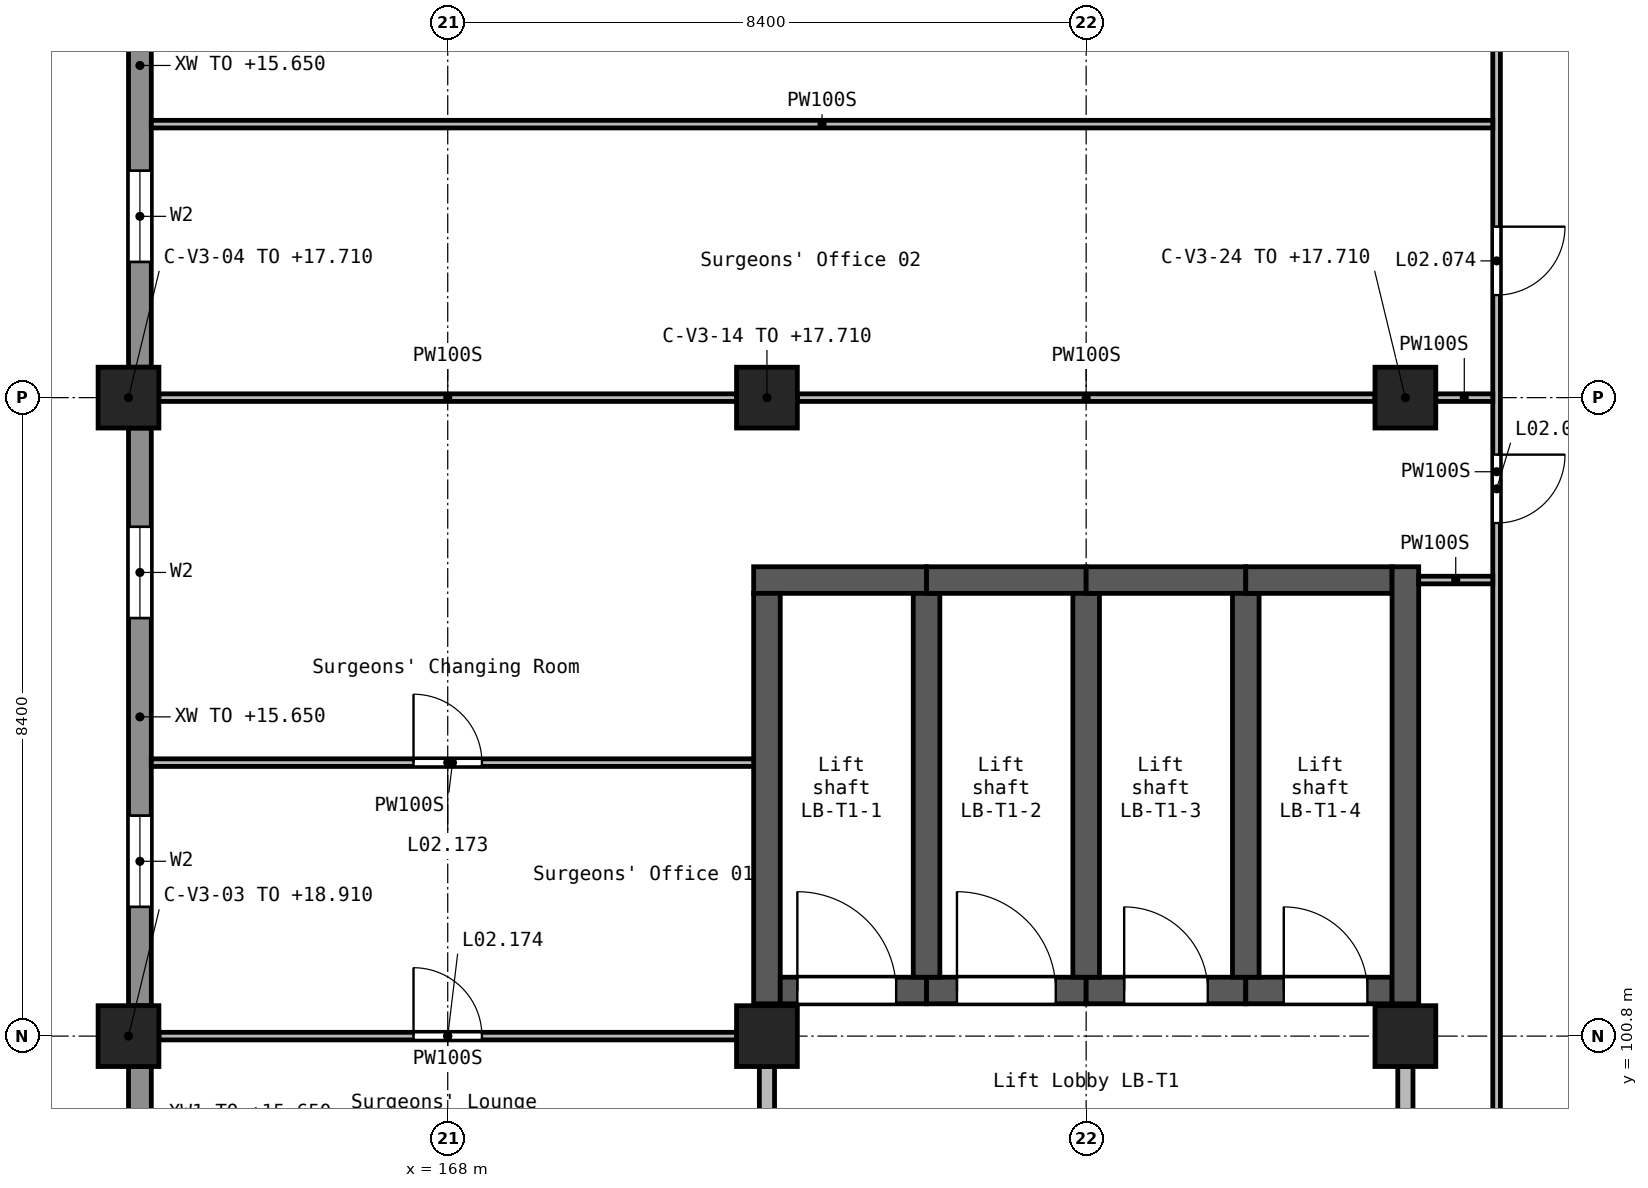
"""IFC4 building model, lengths in metres.
Left out: names, types, materials, properties, quantities, classifications, styles, units other than length and angle.
Written with IfcOpenShell. Run it as: python <this file> out.ifc"""

import sys

from ifc_helpers import new_model, si_unit, direction, frame, frame_2d, origin, origin_2d, place, context, subcontext, project, spatial, rectangle, extrude, element, fill, save


model = new_model("IFC4")
c1 = context("Model", 3, precision=1e-05, world=origin(), true_north=direction((0.0, 1.0)))
c2 = subcontext(c1, "Body", "Model", "MODEL_VIEW")
j1 = project(units=[si_unit("LENGTHUNIT", "METRE"), si_unit("PLANEANGLEUNIT", "RADIAN")], contexts=[c1])
p1 = place(None, origin())
s1 = spatial("IfcSite", under=j1, at=p1, CompositionType="ELEMENT")
p2 = place(p1, origin())
s2 = spatial("IfcBuilding", under=s1, at=p2, CompositionType="ELEMENT")
p3 = place(p2, frame((0.0, 0.0, 12.6)))
s3 = spatial("IfcBuildingStorey", under=s2, at=p3, CompositionType="ELEMENT", Elevation=12.6)
p4 = place(p3, frame((163.8, 100.8, 0.0), z_axis=(0.0, 0.0, 1.0), x_axis=(1.0, 0.0, 0.0)))
e1 = element("IfcColumn", 1, at=p4, inside=s3, PredefinedType="COLUMN", context=c2, shape_type="SweptSolid", body=[
    extrude(rectangle(XDim=0.8, YDim=0.8, at=origin_2d()), origin(), (0.0, 0.0, 1.0), 6.31),
])
p5 = place(p3, frame((163.8, 109.2, 0.0), z_axis=(0.0, 0.0, 1.0), x_axis=(1.0, 0.0, 0.0)))
e2 = element("IfcColumn", 2, at=p5, inside=s3, PredefinedType="COLUMN", context=c2, shape_type="SweptSolid", body=[
    extrude(rectangle(XDim=0.8, YDim=0.8, at=origin_2d()), origin(), (0.0, 0.0, 1.0), 5.11),
])
p6 = place(p3, frame((172.2, 100.8, 0.0), z_axis=(0.0, 0.0, 1.0), x_axis=(1.0, 0.0, 0.0)))
e3 = element("IfcColumn", 3, at=p6, inside=s3, PredefinedType="COLUMN", context=c2, shape_type="SweptSolid", body=[
    extrude(rectangle(XDim=0.8, YDim=0.8, at=origin_2d()), origin(), (0.0, 0.0, 1.0), 6.31),
])
p7 = place(p3, frame((172.2, 109.2, 0.0), z_axis=(0.0, 0.0, 1.0), x_axis=(1.0, 0.0, 0.0)))
e4 = element("IfcColumn", 4, at=p7, inside=s3, PredefinedType="COLUMN", context=c2, shape_type="SweptSolid", body=[
    extrude(rectangle(XDim=0.8, YDim=0.8, at=origin_2d()), origin(), (0.0, 0.0, 1.0), 5.11),
])
p8 = place(p3, frame((180.6, 100.8, 0.0), z_axis=(0.0, 0.0, 1.0), x_axis=(1.0, 0.0, 0.0)))
e5 = element("IfcColumn", 5, at=p8, inside=s3, PredefinedType="COLUMN", context=c2, shape_type="SweptSolid", body=[
    extrude(rectangle(XDim=0.8, YDim=0.8, at=origin_2d()), origin(), (0.0, 0.0, 1.0), 6.31),
])
p9 = place(p3, frame((180.6, 109.2, 0.0), z_axis=(0.0, 0.0, 1.0), x_axis=(1.0, 0.0, 0.0)))
e6 = element("IfcColumn", 6, at=p9, inside=s3, PredefinedType="COLUMN", context=c2, shape_type="SweptSolid", body=[
    extrude(rectangle(XDim=0.8, YDim=0.8, at=origin_2d()), origin(), (0.0, 0.0, 1.0), 5.11),
])
p10 = place(p3, frame((172.025, 106.8, 0.0), z_axis=(0.0, 0.0, 1.0), x_axis=(1.0, 0.0, 0.0)))
e7 = element("IfcWall", 7, at=p10, inside=s3, PredefinedType="SHEAR", context=c2, shape_type="SweptSolid", body=[
    extrude(rectangle(XDim=2.275, YDim=0.35, at=frame_2d((1.138, 0.0))), origin(), (0.0, 0.0, 1.0), 4.2),
])
p11 = place(p3, frame((172.2, 101.225, 0.0), z_axis=(0.0, 0.0, 1.0), x_axis=(0.0, 1.0, 0.0)))
e8 = element("IfcWall", 8, at=p11, inside=s3, PredefinedType="SHEAR", context=c2, shape_type="SweptSolid", body=[
    extrude(rectangle(XDim=5.4, YDim=0.35, at=frame_2d((2.7, 0.0))), origin(), (0.0, 0.0, 1.0), 4.2),
])
p12 = place(p3, frame((172.375, 101.4, 0.0), z_axis=(0.0, 0.0, 1.0), x_axis=(1.0, 0.0, 0.0)))
e9 = element("IfcWall", 9, at=p12, inside=s3, PredefinedType="SHEAR", context=c2, shape_type="SweptSolid", body=[
    extrude(rectangle(XDim=1.925, YDim=0.35, at=frame_2d((0.962, 0.0))), origin(), (0.0, 0.0, 1.0), 4.2),
])
p13 = place(p12, frame((0.225, 0.0, 0.0)))
e10 = element("IfcOpeningElement", 10, at=p13, cuts=e9, PredefinedType="OPENING", context=c2, shape_type="SweptSolid", body=[
    extrude(rectangle(XDim=1.3, YDim=2.1, at=frame_2d((0.65, 1.05))), frame((0.0, 0.185, 0.0), z_axis=(0.0, -1.0, 0.0), x_axis=(1.0, 0.0, 0.0)), (0.0, 0.0, 1.0), 0.37),
])
p14 = place(p3, frame((174.3, 101.4, 0.0), z_axis=(0.0, 0.0, 1.0), x_axis=(1.0, 0.0, 0.0)))
e11 = element("IfcWall", 11, at=p14, inside=s3, PredefinedType="SHEAR", context=c2, shape_type="SweptSolid", body=[
    extrude(rectangle(XDim=2.1, YDim=0.35, at=frame_2d((1.05, 0.0))), origin(), (0.0, 0.0, 1.0), 4.2),
])
p15 = place(p14, frame((0.4, 0.0, 0.0)))
e12 = element("IfcOpeningElement", 12, at=p15, cuts=e11, PredefinedType="OPENING", context=c2, shape_type="SweptSolid", body=[
    extrude(rectangle(XDim=1.3, YDim=2.1, at=frame_2d((0.65, 1.05))), frame((0.0, 0.185, 0.0), z_axis=(0.0, -1.0, 0.0), x_axis=(1.0, 0.0, 0.0)), (0.0, 0.0, 1.0), 0.37),
])
p16 = place(p3, frame((174.3, 101.575, 0.0), z_axis=(0.0, 0.0, 1.0), x_axis=(0.0, 1.0, 0.0)))
e13 = element("IfcWall", 13, at=p16, inside=s3, PredefinedType="SHEAR", context=c2, shape_type="SweptSolid", body=[
    extrude(rectangle(XDim=5.05, YDim=0.35, at=frame_2d((2.525, 0.0))), origin(), (0.0, 0.0, 1.0), 4.2),
])
p17 = place(p3, frame((174.3, 106.8, 0.0), z_axis=(0.0, 0.0, 1.0), x_axis=(1.0, 0.0, 0.0)))
e14 = element("IfcWall", 14, at=p17, inside=s3, PredefinedType="SHEAR", context=c2, shape_type="SweptSolid", body=[
    extrude(rectangle(XDim=2.1, YDim=0.35, at=frame_2d((1.05, 0.0))), origin(), (0.0, 0.0, 1.0), 4.2),
])
p18 = place(p3, frame((176.4, 101.4, 0.0), z_axis=(0.0, 0.0, 1.0), x_axis=(1.0, 0.0, 0.0)))
e15 = element("IfcWall", 15, at=p18, inside=s3, PredefinedType="SHEAR", context=c2, shape_type="SweptSolid", body=[
    extrude(rectangle(XDim=2.1, YDim=0.35, at=frame_2d((1.05, 0.0))), origin(), (0.0, 0.0, 1.0), 4.2),
])
p19 = place(p18, frame((0.5, 0.0, 0.0)))
e16 = element("IfcOpeningElement", 16, at=p19, cuts=e15, PredefinedType="OPENING", context=c2, shape_type="SweptSolid", body=[
    extrude(rectangle(XDim=1.1, YDim=2.1, at=frame_2d((0.55, 1.05))), frame((0.0, 0.185, 0.0), z_axis=(0.0, -1.0, 0.0), x_axis=(1.0, 0.0, 0.0)), (0.0, 0.0, 1.0), 0.37),
])
p20 = place(p3, frame((176.4, 101.575, 0.0), z_axis=(0.0, 0.0, 1.0), x_axis=(0.0, 1.0, 0.0)))
e17 = element("IfcWall", 17, at=p20, inside=s3, PredefinedType="SHEAR", context=c2, shape_type="SweptSolid", body=[
    extrude(rectangle(XDim=5.05, YDim=0.35, at=frame_2d((2.525, 0.0))), origin(), (0.0, 0.0, 1.0), 4.2),
])
p21 = place(p3, frame((176.4, 106.8, 0.0), z_axis=(0.0, 0.0, 1.0), x_axis=(1.0, 0.0, 0.0)))
e18 = element("IfcWall", 18, at=p21, inside=s3, PredefinedType="SHEAR", context=c2, shape_type="SweptSolid", body=[
    extrude(rectangle(XDim=2.1, YDim=0.35, at=frame_2d((1.05, 0.0))), origin(), (0.0, 0.0, 1.0), 4.2),
])
p22 = place(p3, frame((178.5, 101.4, 0.0), z_axis=(0.0, 0.0, 1.0), x_axis=(1.0, 0.0, 0.0)))
e19 = element("IfcWall", 19, at=p22, inside=s3, PredefinedType="SHEAR", context=c2, shape_type="SweptSolid", body=[
    extrude(rectangle(XDim=1.925, YDim=0.35, at=frame_2d((0.962, 0.0))), origin(), (0.0, 0.0, 1.0), 4.2),
])
p23 = place(p22, frame((0.5, 0.0, 0.0)))
e20 = element("IfcOpeningElement", 20, at=p23, cuts=e19, PredefinedType="OPENING", context=c2, shape_type="SweptSolid", body=[
    extrude(rectangle(XDim=1.1, YDim=2.1, at=frame_2d((0.55, 1.05))), frame((0.0, 0.185, 0.0), z_axis=(0.0, -1.0, 0.0), x_axis=(1.0, 0.0, 0.0)), (0.0, 0.0, 1.0), 0.37),
])
p24 = place(p3, frame((178.5, 101.575, 0.0), z_axis=(0.0, 0.0, 1.0), x_axis=(0.0, 1.0, 0.0)))
e21 = element("IfcWall", 21, at=p24, inside=s3, PredefinedType="SHEAR", context=c2, shape_type="SweptSolid", body=[
    extrude(rectangle(XDim=5.05, YDim=0.35, at=frame_2d((2.525, 0.0))), origin(), (0.0, 0.0, 1.0), 4.2),
])
p25 = place(p3, frame((178.5, 106.8, 0.0), z_axis=(0.0, 0.0, 1.0), x_axis=(1.0, 0.0, 0.0)))
e22 = element("IfcWall", 22, at=p25, inside=s3, PredefinedType="SHEAR", context=c2, shape_type="SweptSolid", body=[
    extrude(rectangle(XDim=1.925, YDim=0.35, at=frame_2d((0.962, 0.0))), origin(), (0.0, 0.0, 1.0), 4.2),
])
p26 = place(p3, frame((180.6, 101.225, 0.0), z_axis=(0.0, 0.0, 1.0), x_axis=(0.0, 1.0, 0.0)))
e23 = element("IfcWall", 23, at=p26, inside=s3, PredefinedType="SHEAR", context=c2, shape_type="SweptSolid", body=[
    extrude(rectangle(XDim=5.75, YDim=0.35, at=frame_2d((2.875, 0.0))), origin(), (0.0, 0.0, 1.0), 4.2),
])
p27 = place(p3, frame((163.95, 117.54, 0.0), z_axis=(0.0, 0.0, 1.0), x_axis=(0.0, -1.0, 0.0)))
e24 = element("IfcWall", 24, at=p27, inside=s3, PredefinedType="STANDARD", context=c2, shape_type="SweptSolid", body=[
    extrude(rectangle(XDim=7.94, YDim=0.3, at=frame_2d((3.97, 0.0))), origin(), (0.0, 0.0, 1.0), 3.05),
])
p28 = place(p27, frame((1.385, 0.0, 1.2)))
e25 = element("IfcOpeningElement", 25, at=p28, cuts=e24, PredefinedType="OPENING", context=c2, shape_type="SweptSolid", body=[
    extrude(rectangle(XDim=1.2, YDim=1.2, at=frame_2d((0.6, 0.6))), frame((0.0, 0.16, 0.0), z_axis=(0.0, -1.0, 0.0), x_axis=(1.0, 0.0, 0.0)), (0.0, 0.0, 1.0), 0.32),
])
p29 = place(p27, frame((5.355, 0.0, 1.2)))
e26 = element("IfcOpeningElement", 26, at=p29, cuts=e24, PredefinedType="OPENING", context=c2, shape_type="SweptSolid", body=[
    extrude(rectangle(XDim=1.2, YDim=1.2, at=frame_2d((0.6, 0.6))), frame((0.0, 0.16, 0.0), z_axis=(0.0, -1.0, 0.0), x_axis=(1.0, 0.0, 0.0)), (0.0, 0.0, 1.0), 0.32),
])
p30 = place(p3, frame((163.95, 108.8, 0.0), z_axis=(0.0, 0.0, 1.0), x_axis=(0.0, -1.0, 0.0)))
e27 = element("IfcWall", 27, at=p30, inside=s3, PredefinedType="STANDARD", context=c2, shape_type="SweptSolid", body=[
    extrude(rectangle(XDim=7.6, YDim=0.3, at=frame_2d((3.8, 0.0))), origin(), (0.0, 0.0, 1.0), 3.05),
])
p31 = place(p30, frame((1.3, 0.0, 1.2)))
e28 = element("IfcOpeningElement", 28, at=p31, cuts=e27, PredefinedType="OPENING", context=c2, shape_type="SweptSolid", body=[
    extrude(rectangle(XDim=1.2, YDim=1.2, at=frame_2d((0.6, 0.6))), frame((0.0, 0.16, 0.0), z_axis=(0.0, -1.0, 0.0), x_axis=(1.0, 0.0, 0.0)), (0.0, 0.0, 1.0), 0.32),
])
p32 = place(p30, frame((5.1, 0.0, 1.2)))
e29 = element("IfcOpeningElement", 29, at=p32, cuts=e27, PredefinedType="OPENING", context=c2, shape_type="SweptSolid", body=[
    extrude(rectangle(XDim=1.2, YDim=1.2, at=frame_2d((0.6, 0.6))), frame((0.0, 0.16, 0.0), z_axis=(0.0, -1.0, 0.0), x_axis=(1.0, 0.0, 0.0)), (0.0, 0.0, 1.0), 0.32),
])
p33 = place(p3, frame((163.95, 100.4, 0.0), z_axis=(0.0, 0.0, 1.0), x_axis=(0.0, -1.0, 0.0)))
e30 = element("IfcWall", 30, at=p33, inside=s3, PredefinedType="STANDARD", context=c2, shape_type="SweptSolid", body=[
    extrude(rectangle(XDim=1.225, YDim=0.3, at=frame_2d((0.612, 0.0))), origin(), (0.0, 0.0, 1.0), 3.05),
])
for number, where, z_axis, x_axis in (
    (31, (172.2, 99.1, 0.0), (0.0, 0.0, 1.0), (0.0, 1.0, 0.0)),
    (32, (180.6, 99.1, 0.0), (0.0, 0.0, 1.0), (0.0, 1.0, 0.0)),
):
    element("IfcWall", number, at=place(p3, frame(where, z_axis=z_axis, x_axis=x_axis)), inside=s3, PredefinedType="SOLIDWALL", context=c2, shape_type="SweptSolid", body=[
        extrude(rectangle(XDim=1.3, YDim=0.2, at=frame_2d((0.65, 0.0))), origin(), (0.0, 0.0, 1.0), 3.85),
    ])
p34 = place(p3, frame((181.8, 117.5, 0.0), z_axis=(0.0, 0.0, 1.0), x_axis=(0.0, -1.0, 0.0)))
e33 = element("IfcWall", 33, at=p34, inside=s3, PredefinedType="PARTITIONING", context=c2, shape_type="SweptSolid", body=[
    extrude(rectangle(XDim=18.55, YDim=0.1, at=frame_2d((9.275, 0.0))), origin(), (0.0, 0.0, 1.0), 3.85),
])
p35 = place(p34, frame((9.05, 0.0, 0.0)))
e34 = element("IfcOpeningElement", 34, at=p35, cuts=e33, PredefinedType="OPENING", context=c2, shape_type="SweptSolid", body=[
    extrude(rectangle(XDim=0.9, YDim=2.1, at=frame_2d((0.45, 1.05))), frame((0.0, 0.06, 0.0), z_axis=(0.0, -1.0, 0.0), x_axis=(1.0, 0.0, 0.0)), (0.0, 0.0, 1.0), 0.12),
])
p36 = place(p34, frame((6.051, 0.0, 0.0)))
e35 = element("IfcOpeningElement", 35, at=p36, cuts=e33, PredefinedType="OPENING", context=c2, shape_type="SweptSolid", body=[
    extrude(rectangle(XDim=0.9, YDim=2.1, at=frame_2d((0.45, 1.05))), frame((0.0, 0.06, 0.0), z_axis=(0.0, -1.0, 0.0), x_axis=(1.0, 0.0, 0.0)), (0.0, 0.0, 1.0), 0.12),
])
p37 = place(p34, frame((1.851, 0.0, 0.0)))
e36 = element("IfcOpeningElement", 36, at=p37, cuts=e33, PredefinedType="OPENING", context=c2, shape_type="SweptSolid", body=[
    extrude(rectangle(XDim=0.9, YDim=2.1, at=frame_2d((0.45, 1.05))), frame((0.0, 0.06, 0.0), z_axis=(0.0, -1.0, 0.0), x_axis=(1.0, 0.0, 0.0)), (0.0, 0.0, 1.0), 0.12),
])
p38 = place(p3, frame((164.2, 109.2, 0.0), z_axis=(0.0, 0.0, 1.0), x_axis=(1.0, 0.0, 0.0)))
e37 = element("IfcWall", 37, at=p38, inside=s3, PredefinedType="PARTITIONING", context=c2, shape_type="SweptSolid", body=[
    extrude(rectangle(XDim=7.6, YDim=0.1, at=frame_2d((3.8, 0.0))), origin(), (0.0, 0.0, 1.0), 3.85),
])
p39 = place(p3, frame((172.6, 109.2, 0.0), z_axis=(0.0, 0.0, 1.0), x_axis=(1.0, 0.0, 0.0)))
e38 = element("IfcWall", 38, at=p39, inside=s3, PredefinedType="PARTITIONING", context=c2, shape_type="SweptSolid", body=[
    extrude(rectangle(XDim=7.6, YDim=0.1, at=frame_2d((3.8, 0.0))), origin(), (0.0, 0.0, 1.0), 3.85),
])
p40 = place(p3, frame((181.0, 109.2, 0.0), z_axis=(0.0, 0.0, 1.0), x_axis=(1.0, 0.0, 0.0)))
e39 = element("IfcWall", 39, at=p40, inside=s3, PredefinedType="PARTITIONING", context=c2, shape_type="SweptSolid", body=[
    extrude(rectangle(XDim=0.75, YDim=0.1, at=frame_2d((0.375, 0.0))), origin(), (0.0, 0.0, 1.0), 3.85),
])
p41 = place(p3, frame((164.1, 112.798, 0.0), z_axis=(0.0, 0.0, 1.0), x_axis=(1.0, 0.0, 0.0)))
e40 = element("IfcWall", 40, at=p41, inside=s3, PredefinedType="PARTITIONING", context=c2, shape_type="SweptSolid", body=[
    extrude(rectangle(XDim=17.65, YDim=0.1, at=frame_2d((8.825, 0.0))), origin(), (0.0, 0.0, 1.0), 3.85),
])
p42 = place(p3, frame((180.775, 106.8, 0.0), z_axis=(0.0, 0.0, 1.0), x_axis=(1.0, 0.0, 0.0)))
e41 = element("IfcWall", 41, at=p42, inside=s3, PredefinedType="PARTITIONING", context=c2, shape_type="SweptSolid", body=[
    extrude(rectangle(XDim=0.975, YDim=0.1, at=frame_2d((0.488, 0.0))), origin(), (0.0, 0.0, 1.0), 3.85),
])
p43 = place(p3, frame((164.2, 100.8, 0.0), z_axis=(0.0, 0.0, 1.0), x_axis=(1.0, 0.0, 0.0)))
e42 = element("IfcWall", 42, at=p43, inside=s3, PredefinedType="PARTITIONING", context=c2, shape_type="SweptSolid", body=[
    extrude(rectangle(XDim=7.6, YDim=0.1, at=frame_2d((3.8, 0.0))), origin(), (0.0, 0.0, 1.0), 3.85),
])
p44 = place(p43, frame((3.35, 0.0, 0.0)))
e43 = element("IfcOpeningElement", 43, at=p44, cuts=e42, PredefinedType="OPENING", context=c2, shape_type="SweptSolid", body=[
    extrude(rectangle(XDim=0.9, YDim=2.1, at=frame_2d((0.45, 1.05))), frame((0.0, 0.06, 0.0), z_axis=(0.0, -1.0, 0.0), x_axis=(1.0, 0.0, 0.0)), (0.0, 0.0, 1.0), 0.12),
])
p45 = place(p3, frame((164.1, 104.398, 0.0), z_axis=(0.0, 0.0, 1.0), x_axis=(1.0, 0.0, 0.0)))
e44 = element("IfcWall", 44, at=p45, inside=s3, PredefinedType="PARTITIONING", context=c2, shape_type="SweptSolid", body=[
    extrude(rectangle(XDim=7.925, YDim=0.1, at=frame_2d((3.962, 0.0))), origin(), (0.0, 0.0, 1.0), 3.85),
])
p46 = place(p45, frame((3.45, 0.0, 0.0)))
e45 = element("IfcOpeningElement", 45, at=p46, cuts=e44, PredefinedType="OPENING", context=c2, shape_type="SweptSolid", body=[
    extrude(rectangle(XDim=0.9, YDim=2.1, at=frame_2d((0.45, 1.05))), frame((0.0, 0.06, 0.0), z_axis=(0.0, -1.0, 0.0), x_axis=(1.0, 0.0, 0.0)), (0.0, 0.0, 1.0), 0.12),
])
p47 = place(p29, origin())
e46 = element("IfcWindow", 46, at=p47, inside=s3, PartitioningType="SINGLE_PANEL", PredefinedType="WINDOW", context=c2, shape_type="SweptSolid", body=[
    extrude(rectangle(XDim=1.2, YDim=1.2, at=frame_2d((0.6, 0.6))), frame((0.0, 0.03, 0.0), z_axis=(0.0, -1.0, 0.0), x_axis=(1.0, 0.0, 0.0)), (0.0, 0.0, 1.0), 0.06),
])
fill(e26, e46)
p48 = place(p31, origin())
e47 = element("IfcWindow", 47, at=p48, inside=s3, PartitioningType="SINGLE_PANEL", PredefinedType="WINDOW", context=c2, shape_type="SweptSolid", body=[
    extrude(rectangle(XDim=1.2, YDim=1.2, at=frame_2d((0.6, 0.6))), frame((0.0, 0.03, 0.0), z_axis=(0.0, -1.0, 0.0), x_axis=(1.0, 0.0, 0.0)), (0.0, 0.0, 1.0), 0.06),
])
fill(e28, e47)
p49 = place(p32, origin())
e48 = element("IfcWindow", 48, at=p49, inside=s3, PartitioningType="SINGLE_PANEL", PredefinedType="WINDOW", context=c2, shape_type="SweptSolid", body=[
    extrude(rectangle(XDim=1.2, YDim=1.2, at=frame_2d((0.6, 0.6))), frame((0.0, 0.03, 0.0), z_axis=(0.0, -1.0, 0.0), x_axis=(1.0, 0.0, 0.0)), (0.0, 0.0, 1.0), 0.06),
])
fill(e29, e48)
p50 = place(p13, origin())
e49 = element("IfcDoor", 49, at=p50, inside=s3, OperationType="DOUBLE_DOOR_SLIDING", PredefinedType="DOOR", context=c2, shape_type="SweptSolid", body=[
    extrude(rectangle(XDim=1.3, YDim=2.1, at=frame_2d((0.65, 1.05))), frame((0.0, 0.025, 0.0), z_axis=(0.0, -1.0, 0.0), x_axis=(1.0, 0.0, 0.0)), (0.0, 0.0, 1.0), 0.05),
])
fill(e10, e49)
p51 = place(p15, origin())
e50 = element("IfcDoor", 50, at=p51, inside=s3, OperationType="DOUBLE_DOOR_SLIDING", PredefinedType="DOOR", context=c2, shape_type="SweptSolid", body=[
    extrude(rectangle(XDim=1.3, YDim=2.1, at=frame_2d((0.65, 1.05))), frame((0.0, 0.025, 0.0), z_axis=(0.0, -1.0, 0.0), x_axis=(1.0, 0.0, 0.0)), (0.0, 0.0, 1.0), 0.05),
])
fill(e12, e50)
p52 = place(p19, origin())
e51 = element("IfcDoor", 51, at=p52, inside=s3, OperationType="DOUBLE_DOOR_SLIDING", PredefinedType="DOOR", context=c2, shape_type="SweptSolid", body=[
    extrude(rectangle(XDim=1.1, YDim=2.1, at=frame_2d((0.55, 1.05))), frame((0.0, 0.025, 0.0), z_axis=(0.0, -1.0, 0.0), x_axis=(1.0, 0.0, 0.0)), (0.0, 0.0, 1.0), 0.05),
])
fill(e16, e51)
p53 = place(p23, origin())
e52 = element("IfcDoor", 52, at=p53, inside=s3, OperationType="DOUBLE_DOOR_SLIDING", PredefinedType="DOOR", context=c2, shape_type="SweptSolid", body=[
    extrude(rectangle(XDim=1.1, YDim=2.1, at=frame_2d((0.55, 1.05))), frame((0.0, 0.025, 0.0), z_axis=(0.0, -1.0, 0.0), x_axis=(1.0, 0.0, 0.0)), (0.0, 0.0, 1.0), 0.05),
])
fill(e20, e52)
p54 = place(p35, frame((0.9, 0.0, 0.0), z_axis=(0.0, 0.0, 1.0), x_axis=(-1.0, 0.0, 0.0)))
e53 = element("IfcDoor", 53, at=p54, inside=s3, OperationType="SINGLE_SWING_LEFT", PredefinedType="DOOR", context=c2, shape_type="SweptSolid", body=[
    extrude(rectangle(XDim=0.9, YDim=2.1, at=frame_2d((0.45, 1.05))), frame((0.0, 0.025, 0.0), z_axis=(0.0, -1.0, 0.0), x_axis=(1.0, 0.0, 0.0)), (0.0, 0.0, 1.0), 0.05),
])
fill(e34, e53)
p55 = place(p36, frame((0.9, 0.0, 0.0), z_axis=(0.0, 0.0, 1.0), x_axis=(-1.0, 0.0, 0.0)))
e54 = element("IfcDoor", 54, at=p55, inside=s3, OperationType="SINGLE_SWING_RIGHT", PredefinedType="DOOR", context=c2, shape_type="SweptSolid", body=[
    extrude(rectangle(XDim=0.9, YDim=2.1, at=frame_2d((0.45, 1.05))), frame((0.0, 0.025, 0.0), z_axis=(0.0, -1.0, 0.0), x_axis=(1.0, 0.0, 0.0)), (0.0, 0.0, 1.0), 0.05),
])
fill(e35, e54)
p56 = place(p46, frame((0.9, 0.0, 0.0), z_axis=(0.0, 0.0, 1.0), x_axis=(-1.0, 0.0, 0.0)))
e55 = element("IfcDoor", 55, at=p56, inside=s3, OperationType="SINGLE_SWING_RIGHT", PredefinedType="DOOR", context=c2, shape_type="SweptSolid", body=[
    extrude(rectangle(XDim=0.9, YDim=2.1, at=frame_2d((0.45, 1.05))), frame((0.0, 0.025, 0.0), z_axis=(0.0, -1.0, 0.0), x_axis=(1.0, 0.0, 0.0)), (0.0, 0.0, 1.0), 0.05),
])
fill(e45, e55)
p57 = place(p44, frame((0.9, 0.0, 0.0), z_axis=(0.0, 0.0, 1.0), x_axis=(-1.0, 0.0, 0.0)))
e56 = element("IfcDoor", 56, at=p57, inside=s3, OperationType="SINGLE_SWING_RIGHT", PredefinedType="DOOR", context=c2, shape_type="SweptSolid", body=[
    extrude(rectangle(XDim=0.9, YDim=2.1, at=frame_2d((0.45, 1.05))), frame((0.0, 0.025, 0.0), z_axis=(0.0, -1.0, 0.0), x_axis=(1.0, 0.0, 0.0)), (0.0, 0.0, 1.0), 0.05),
])
fill(e43, e56)
save(model, sys.argv[1])
